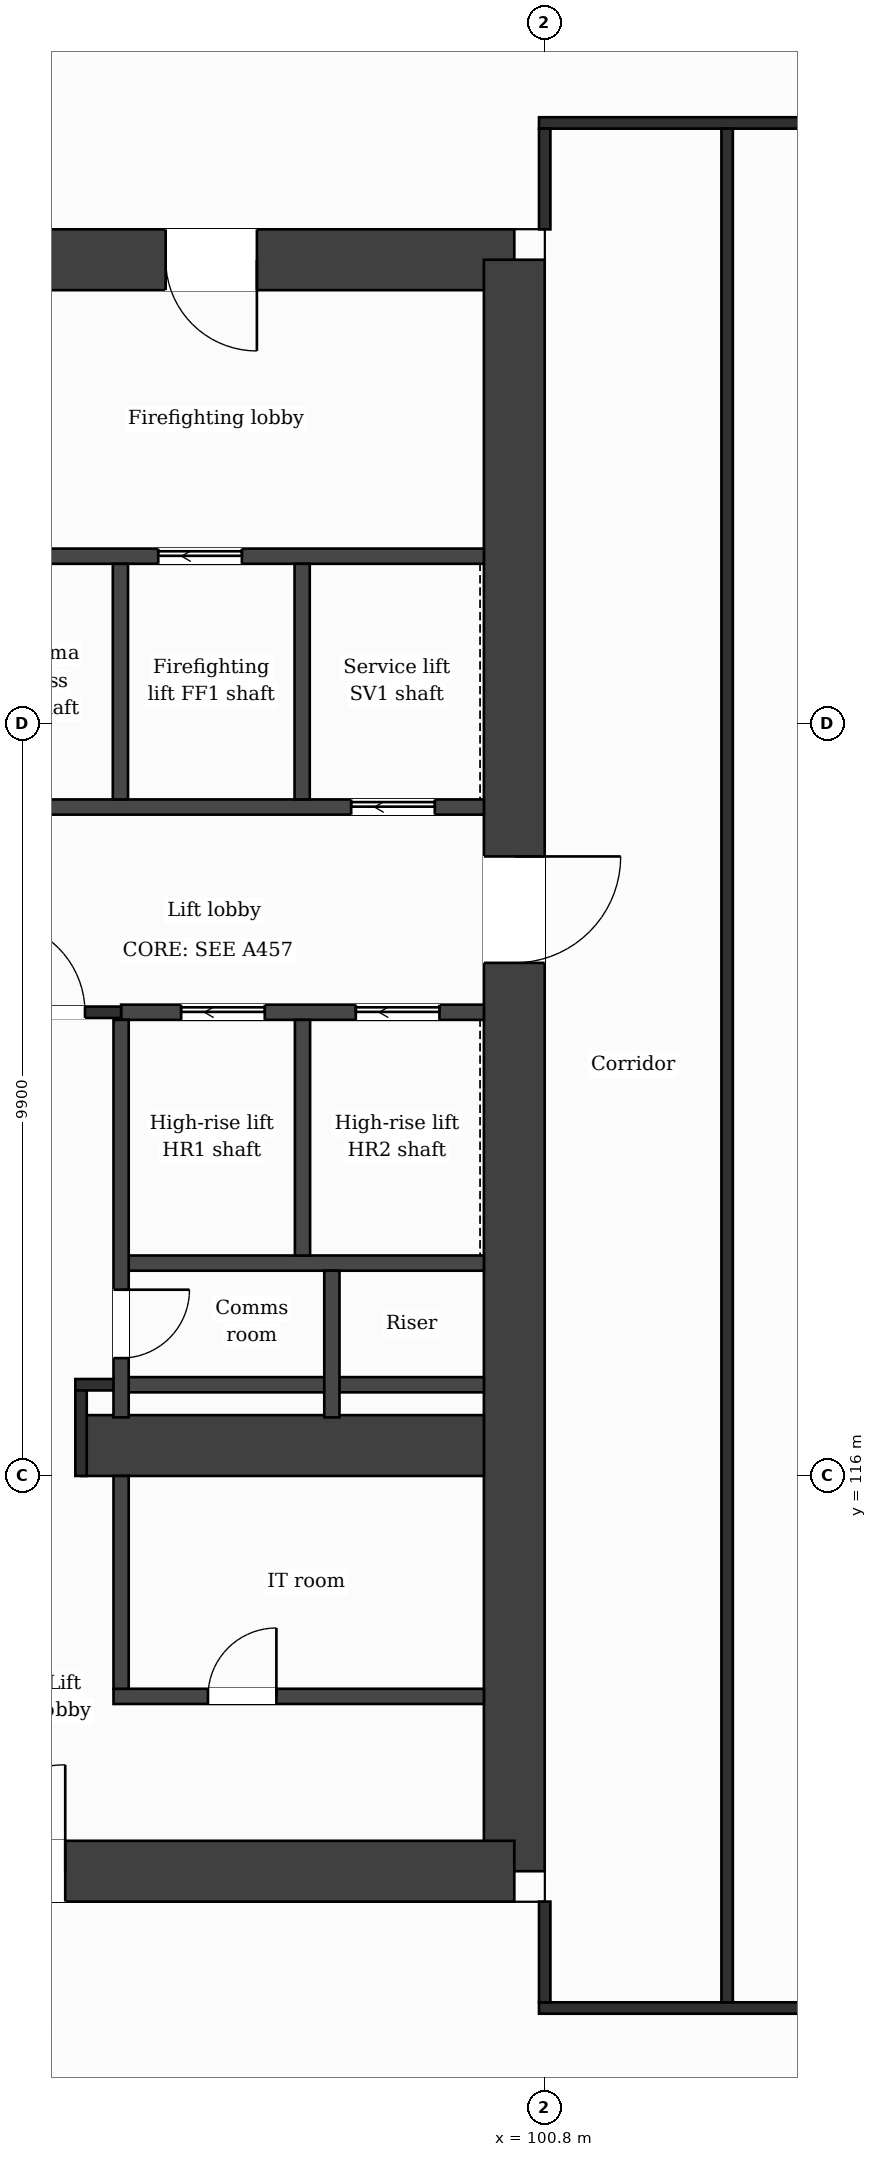
"""IFC4 building model, lengths in metres.
Left out: names, types, materials, properties, quantities, classifications, styles, units other than length and angle.
Written with IfcOpenShell. Run it as: python <this file> out.ifc"""

import sys

from ifc_helpers import new_model, si_unit, direction, frame, frame_2d, origin, place, context, subcontext, project, spatial, rectangle, extrude, element, fill, save


model = new_model("IFC4")
c1 = context("Model", 3, precision=1e-05, world=origin(), true_north=direction((0.0, 1.0)))
c2 = subcontext(c1, "Body", "Model", "MODEL_VIEW")
j1 = project(units=[si_unit("LENGTHUNIT", "METRE"), si_unit("PLANEANGLEUNIT", "RADIAN")], contexts=[c1])
p1 = place(None, origin())
s1 = spatial("IfcSite", under=j1, at=p1, CompositionType="ELEMENT")
p2 = place(p1, origin())
s2 = spatial("IfcBuilding", under=s1, at=p2, CompositionType="ELEMENT")
p3 = place(p2, frame((0.0, 0.0, 231.8)))
s3 = spatial("IfcBuildingStorey", under=s2, at=p3, CompositionType="ELEMENT", Elevation=231.8)
p4 = place(p3, frame((88.98, 132.0, 0.0), z_axis=(0.0, 0.0, 1.0), x_axis=(1.0, 0.0, 0.0)))
e1 = element("IfcWall", 1, at=p4, inside=s3, PredefinedType="SHEAR", context=c2, shape_type="SweptSolid", body=[
    extrude(rectangle(XDim=11.419, YDim=0.8, at=frame_2d((5.71, 0.0))), origin(), (0.0, 0.0, 1.0), 3.7),
])
p5 = place(p4, frame((6.833, 0.0, 0.0)))
e2 = element("IfcOpeningElement", 2, at=p5, cuts=e1, PredefinedType="OPENING", context=c2, shape_type="SweptSolid", body=[
    extrude(rectangle(XDim=1.2, YDim=2.1, at=frame_2d((0.6, 1.05))), frame((0.0, 0.41, 0.0), z_axis=(0.0, -1.0, 0.0), x_axis=(1.0, 0.0, 0.0)), (0.0, 0.0, 1.0), 0.82),
])
p6 = place(p3, frame((100.4, 132.0, 0.0), z_axis=(0.0, 0.0, 1.0), x_axis=(0.0, -1.0, 0.0)))
e3 = element("IfcWall", 3, at=p6, inside=s3, PredefinedType="SHEAR", context=c2, shape_type="SweptSolid", body=[
    extrude(rectangle(XDim=21.2, YDim=0.8, at=frame_2d((10.6, 0.0))), origin(), (0.0, 0.0, 1.0), 3.7),
])
p7 = place(p6, frame((7.85, 0.0, 0.0)))
e4 = element("IfcOpeningElement", 4, at=p7, cuts=e3, PredefinedType="OPENING", context=c2, shape_type="SweptSolid", body=[
    extrude(rectangle(XDim=1.4, YDim=2.1, at=frame_2d((0.7, 1.05))), frame((0.0, 0.41, 0.0), z_axis=(0.0, -1.0, 0.0), x_axis=(1.0, 0.0, 0.0)), (0.0, 0.0, 1.0), 0.82),
])
p8 = place(p3, frame((100.4, 110.8, 0.0), z_axis=(0.0, 0.0, 1.0), x_axis=(-1.0, 0.0, 0.0)))
e5 = element("IfcWall", 5, at=p8, inside=s3, PredefinedType="SHEAR", context=c2, shape_type="SweptSolid", body=[
    extrude(rectangle(XDim=14.273, YDim=0.8, at=frame_2d((7.137, 0.0))), origin(), (0.0, 0.0, 1.0), 3.7),
])
p9 = place(p8, frame((5.908, 0.0, 0.0)))
e6 = element("IfcOpeningElement", 6, at=p9, cuts=e5, PredefinedType="OPENING", context=c2, shape_type="SweptSolid", body=[
    extrude(rectangle(XDim=1.4, YDim=2.1, at=frame_2d((0.7, 1.05))), frame((0.0, 0.41, 0.0), z_axis=(0.0, -1.0, 0.0), x_axis=(1.0, 0.0, 0.0)), (0.0, 0.0, 1.0), 0.82),
])
p10 = place(p3, frame((94.7, 116.4, 0.0), z_axis=(0.0, 0.0, 1.0), x_axis=(1.0, 0.0, 0.0)))
e7 = element("IfcWall", 7, at=p10, inside=s3, PredefinedType="SHEAR", context=c2, shape_type="SweptSolid", body=[
    extrude(rectangle(XDim=5.3, YDim=0.8, at=frame_2d((2.65, 0.0))), origin(), (0.0, 0.0, 1.0), 3.7),
])
p11 = place(p3, frame((100.725, 109.0, 0.0), z_axis=(0.0, 0.0, 1.0), x_axis=(1.0, 0.0, 0.0)))
e8 = element("IfcWall", 8, at=p11, inside=s3, PredefinedType="PARTITIONING", context=c2, shape_type="SweptSolid", body=[
    extrude(rectangle(XDim=25.35, YDim=0.15, at=frame_2d((12.675, 0.0))), origin(), (0.0, 0.0, 1.0), 3.38),
])
p12 = place(p11, frame((5.405, 0.0, 0.0)))
e9 = element("IfcOpeningElement", 9, at=p12, cuts=e8, PredefinedType="OPENING", context=c2, shape_type="SweptSolid", body=[
    extrude(rectangle(XDim=1.0, YDim=2.1, at=frame_2d((0.5, 1.05))), frame((0.0, 0.085, 0.0), z_axis=(0.0, -1.0, 0.0), x_axis=(1.0, 0.0, 0.0)), (0.0, 0.0, 1.0), 0.17),
])
p13 = place(p11, frame((12.845, 0.0, 0.0)))
e10 = element("IfcOpeningElement", 10, at=p13, cuts=e8, PredefinedType="OPENING", context=c2, shape_type="SweptSolid", body=[
    extrude(rectangle(XDim=1.0, YDim=2.1, at=frame_2d((0.5, 1.05))), frame((0.0, 0.085, 0.0), z_axis=(0.0, -1.0, 0.0), x_axis=(1.0, 0.0, 0.0)), (0.0, 0.0, 1.0), 0.17),
])
p14 = place(p11, frame((19.805, 0.0, 0.0)))
e11 = element("IfcOpeningElement", 11, at=p14, cuts=e8, PredefinedType="OPENING", context=c2, shape_type="SweptSolid", body=[
    extrude(rectangle(XDim=1.0, YDim=2.1, at=frame_2d((0.5, 1.05))), frame((0.0, 0.085, 0.0), z_axis=(0.0, -1.0, 0.0), x_axis=(1.0, 0.0, 0.0)), (0.0, 0.0, 1.0), 0.17),
])
p15 = place(p3, frame((95.127, 113.1, 0.0), z_axis=(0.0, 0.0, 1.0), x_axis=(1.0, 0.0, 0.0)))
e12 = element("IfcWall", 12, at=p15, inside=s3, PredefinedType="PARTITIONING", context=c2, shape_type="SweptSolid", body=[
    extrude(rectangle(XDim=4.873, YDim=0.2, at=frame_2d((2.437, 0.0))), origin(), (0.0, 0.0, 1.0), 3.38),
])
p16 = place(p15, frame((1.243, 0.0, 0.0)))
e13 = element("IfcOpeningElement", 13, at=p16, cuts=e12, PredefinedType="OPENING", context=c2, shape_type="SweptSolid", body=[
    extrude(rectangle(XDim=0.9, YDim=2.1, at=frame_2d((0.45, 1.05))), frame((0.0, 0.11, 0.0), z_axis=(0.0, -1.0, 0.0), x_axis=(1.0, 0.0, 0.0)), (0.0, 0.0, 1.0), 0.22),
])
p17 = place(p3, frame((95.227, 117.2, 0.0), z_axis=(0.0, 0.0, 1.0), x_axis=(1.0, 0.0, 0.0)))
e14 = element("IfcWall", 14, at=p17, inside=s3, PredefinedType="PARTITIONING", context=c2, shape_type="SweptSolid", body=[
    extrude(rectangle(XDim=4.773, YDim=0.2, at=frame_2d((2.386, 0.0))), origin(), (0.0, 0.0, 1.0), 3.38),
])
p18 = place(p3, frame((94.625, 117.2, 0.0), z_axis=(0.0, 0.0, 1.0), x_axis=(1.0, 0.0, 0.0)))
e15 = element("IfcWall", 15, at=p18, inside=s3, PredefinedType="PARTITIONING", context=c2, shape_type="SweptSolid", body=[
    extrude(rectangle(XDim=0.602, YDim=0.15, at=frame_2d((0.301, 0.0))), origin(), (0.0, 0.0, 1.0), 3.38),
])
p19 = place(p3, frame((95.227, 118.8, 0.0), z_axis=(0.0, 0.0, 1.0), x_axis=(1.0, 0.0, 0.0)))
e16 = element("IfcWall", 16, at=p19, inside=s3, PredefinedType="PARTITIONING", context=c2, shape_type="SweptSolid", body=[
    extrude(rectangle(XDim=4.773, YDim=0.2, at=frame_2d((2.386, 0.0))), origin(), (0.0, 0.0, 1.0), 3.38),
])
p20 = place(p3, frame((95.227, 122.1, 0.0), z_axis=(0.0, 0.0, 1.0), x_axis=(1.0, 0.0, 0.0)))
e17 = element("IfcWall", 17, at=p20, inside=s3, PredefinedType="PARTITIONING", context=c2, shape_type="SweptSolid", body=[
    extrude(rectangle(XDim=4.773, YDim=0.2, at=frame_2d((2.386, 0.0))), origin(), (0.0, 0.0, 1.0), 3.38),
])
p21 = place(p20, frame((0.79, 0.0, 0.0)))
e18 = element("IfcOpeningElement", 18, at=p21, cuts=e17, PredefinedType="OPENING", context=c2, shape_type="SweptSolid", body=[
    extrude(rectangle(XDim=1.1, YDim=2.1, at=frame_2d((0.55, 1.05))), frame((0.0, 0.11, 0.0), z_axis=(0.0, -1.0, 0.0), x_axis=(1.0, 0.0, 0.0)), (0.0, 0.0, 1.0), 0.22),
])
p22 = place(p20, frame((3.088, 0.0, 0.0)))
e19 = element("IfcOpeningElement", 19, at=p22, cuts=e17, PredefinedType="OPENING", context=c2, shape_type="SweptSolid", body=[
    extrude(rectangle(XDim=1.1, YDim=2.1, at=frame_2d((0.55, 1.05))), frame((0.0, 0.11, 0.0), z_axis=(0.0, -1.0, 0.0), x_axis=(1.0, 0.0, 0.0)), (0.0, 0.0, 1.0), 0.22),
])
p23 = place(p3, frame((92.827, 122.1, 0.0), z_axis=(0.0, 0.0, 1.0), x_axis=(1.0, 0.0, 0.0)))
e20 = element("IfcWall", 20, at=p23, inside=s3, PredefinedType="PARTITIONING", context=c2, shape_type="SweptSolid", body=[
    extrude(rectangle(XDim=2.4, YDim=0.15, at=frame_2d((1.2, 0.0))), origin(), (0.0, 0.0, 1.0), 3.38),
])
p24 = place(p23, frame((0.725, 0.0, 0.0)))
e21 = element("IfcOpeningElement", 21, at=p24, cuts=e20, PredefinedType="OPENING", context=c2, shape_type="SweptSolid", body=[
    extrude(rectangle(XDim=1.2, YDim=2.1, at=frame_2d((0.6, 1.05))), frame((0.0, 0.085, 0.0), z_axis=(0.0, -1.0, 0.0), x_axis=(1.0, 0.0, 0.0)), (0.0, 0.0, 1.0), 0.17),
])
p25 = place(p3, frame((92.702, 124.8, 0.0), z_axis=(0.0, 0.0, 1.0), x_axis=(1.0, 0.0, 0.0)))
e22 = element("IfcWall", 22, at=p25, inside=s3, PredefinedType="PARTITIONING", context=c2, shape_type="SweptSolid", body=[
    extrude(rectangle(XDim=7.298, YDim=0.2, at=frame_2d((3.649, 0.0))), origin(), (0.0, 0.0, 1.0), 3.38),
])
p26 = place(p25, frame((5.552, 0.0, 0.0)))
e23 = element("IfcOpeningElement", 23, at=p26, cuts=e22, PredefinedType="OPENING", context=c2, shape_type="SweptSolid", body=[
    extrude(rectangle(XDim=1.1, YDim=2.1, at=frame_2d((0.55, 1.05))), frame((0.0, 0.11, 0.0), z_axis=(0.0, -1.0, 0.0), x_axis=(1.0, 0.0, 0.0)), (0.0, 0.0, 1.0), 0.22),
])
p27 = place(p3, frame((92.827, 128.1, 0.0), z_axis=(0.0, 0.0, 1.0), x_axis=(1.0, 0.0, 0.0)))
e24 = element("IfcWall", 24, at=p27, inside=s3, PredefinedType="PARTITIONING", context=c2, shape_type="SweptSolid", body=[
    extrude(rectangle(XDim=7.173, YDim=0.2, at=frame_2d((3.586, 0.0))), origin(), (0.0, 0.0, 1.0), 3.38),
])
p28 = place(p27, frame((2.889, 0.0, 0.0)))
e25 = element("IfcOpeningElement", 25, at=p28, cuts=e24, PredefinedType="OPENING", context=c2, shape_type="SweptSolid", body=[
    extrude(rectangle(XDim=1.1, YDim=2.1, at=frame_2d((0.55, 1.05))), frame((0.0, 0.11, 0.0), z_axis=(0.0, -1.0, 0.0), x_axis=(1.0, 0.0, 0.0)), (0.0, 0.0, 1.0), 0.22),
])
p29 = place(p3, frame((100.725, 133.8, 0.0), z_axis=(0.0, 0.0, 1.0), x_axis=(1.0, 0.0, 0.0)))
e26 = element("IfcWall", 26, at=p29, inside=s3, PredefinedType="PARTITIONING", context=c2, shape_type="SweptSolid", body=[
    extrude(rectangle(XDim=25.35, YDim=0.15, at=frame_2d((12.675, 0.0))), origin(), (0.0, 0.0, 1.0), 3.38),
])
p30 = place(p29, frame((12.845, 0.0, 0.0)))
e27 = element("IfcOpeningElement", 27, at=p30, cuts=e26, PredefinedType="OPENING", context=c2, shape_type="SweptSolid", body=[
    extrude(rectangle(XDim=1.0, YDim=2.1, at=frame_2d((0.5, 1.05))), frame((0.0, 0.085, 0.0), z_axis=(0.0, -1.0, 0.0), x_axis=(1.0, 0.0, 0.0)), (0.0, 0.0, 1.0), 0.17),
])
p31 = place(p3, frame((94.7, 116.0, 0.0), z_axis=(0.0, 0.0, 1.0), x_axis=(0.0, 1.0, 0.0)))
e28 = element("IfcWall", 28, at=p31, inside=s3, PredefinedType="PARTITIONING", context=c2, shape_type="SweptSolid", body=[
    extrude(rectangle(XDim=1.125, YDim=0.15, at=frame_2d((0.562, 0.0))), origin(), (0.0, 0.0, 1.0), 3.38),
])
p32 = place(p3, frame((95.218, 124.9, 0.0), z_axis=(0.0, 0.0, 1.0), x_axis=(0.0, 1.0, 0.0)))
e29 = element("IfcWall", 29, at=p32, inside=s3, PredefinedType="PARTITIONING", context=c2, shape_type="SweptSolid", body=[
    extrude(rectangle(XDim=3.1, YDim=0.2, at=frame_2d((1.55, 0.0))), origin(), (0.0, 0.0, 1.0), 3.38),
])
p33 = place(p3, frame((95.227, 113.2, 0.0), z_axis=(0.0, 0.0, 1.0), x_axis=(0.0, 1.0, 0.0)))
e30 = element("IfcWall", 30, at=p33, inside=s3, PredefinedType="PARTITIONING", context=c2, shape_type="SweptSolid", body=[
    extrude(rectangle(XDim=2.8, YDim=0.2, at=frame_2d((1.4, 0.0))), origin(), (0.0, 0.0, 1.0), 3.38),
])
p34 = place(p3, frame((95.227, 116.77, 0.0), z_axis=(0.0, 0.0, 1.0), x_axis=(0.0, 1.0, 0.0)))
e31 = element("IfcWall", 31, at=p34, inside=s3, PredefinedType="PARTITIONING", context=c2, shape_type="SweptSolid", body=[
    extrude(rectangle(XDim=5.23, YDim=0.2, at=frame_2d((2.615, 0.0))), origin(), (0.0, 0.0, 1.0), 3.38),
])
p35 = place(p34, frame((0.78, 0.0, 0.0)))
e32 = element("IfcOpeningElement", 32, at=p35, cuts=e31, PredefinedType="OPENING", context=c2, shape_type="SweptSolid", body=[
    extrude(rectangle(XDim=0.9, YDim=2.1, at=frame_2d((0.45, 1.05))), frame((0.0, 0.11, 0.0), z_axis=(0.0, -1.0, 0.0), x_axis=(1.0, 0.0, 0.0)), (0.0, 0.0, 1.0), 0.22),
])
for number, where, z_axis, x_axis in (
    (33, (97.609, 124.9, 0.0), (0.0, 0.0, 1.0), (0.0, 1.0, 0.0)),
    (34, (97.614, 118.9, 0.0), (0.0, 0.0, 1.0), (0.0, 1.0, 0.0)),
):
    element("IfcWall", number, at=place(p3, frame(where, z_axis=z_axis, x_axis=x_axis)), inside=s3, PredefinedType="PARTITIONING", context=c2, shape_type="SweptSolid", body=[
        extrude(rectangle(XDim=3.1, YDim=0.2, at=frame_2d((1.55, 0.0))), origin(), (0.0, 0.0, 1.0), 3.38),
    ])
p36 = place(p3, frame((98.0, 116.77, 0.0), z_axis=(0.0, 0.0, 1.0), x_axis=(0.0, 1.0, 0.0)))
e35 = element("IfcWall", 35, at=p36, inside=s3, PredefinedType="PARTITIONING", context=c2, shape_type="SweptSolid", body=[
    extrude(rectangle(XDim=1.93, YDim=0.2, at=frame_2d((0.965, 0.0))), origin(), (0.0, 0.0, 1.0), 3.38),
])
p37 = place(p3, frame((100.8, 109.075, 0.0), z_axis=(0.0, 0.0, 1.0), x_axis=(0.0, 1.0, 0.0)))
e36 = element("IfcWall", 36, at=p37, inside=s3, PredefinedType="PARTITIONING", context=c2, shape_type="SweptSolid", body=[
    extrude(rectangle(XDim=1.325, YDim=0.15, at=frame_2d((0.663, 0.0))), origin(), (0.0, 0.0, 1.0), 3.38),
])
p38 = place(p3, frame((100.8, 132.4, 0.0), z_axis=(0.0, 0.0, 1.0), x_axis=(0.0, 1.0, 0.0)))
e37 = element("IfcWall", 37, at=p38, inside=s3, PredefinedType="PARTITIONING", context=c2, shape_type="SweptSolid", body=[
    extrude(rectangle(XDim=1.325, YDim=0.15, at=frame_2d((0.663, 0.0))), origin(), (0.0, 0.0, 1.0), 3.38),
])
p39 = place(p3, frame((103.2, 109.075, 0.0), z_axis=(0.0, 0.0, 1.0), x_axis=(0.0, 1.0, 0.0)))
e38 = element("IfcWall", 38, at=p39, inside=s3, PredefinedType="PARTITIONING", context=c2, shape_type="SweptSolid", body=[
    extrude(rectangle(XDim=24.65, YDim=0.15, at=frame_2d((12.325, 0.0))), origin(), (0.0, 0.0, 1.0), 3.38),
])
p40 = place(p24, origin())
e39 = element("IfcDoor", 39, at=p40, inside=s3, OperationType="SINGLE_SWING_LEFT", PredefinedType="DOOR", context=c2, shape_type="SweptSolid", body=[
    extrude(rectangle(XDim=1.2, YDim=2.1, at=frame_2d((0.6, 1.05))), frame((0.0, 0.025, 0.0), z_axis=(0.0, -1.0, 0.0), x_axis=(1.0, 0.0, 0.0)), (0.0, 0.0, 1.0), 0.05),
])
fill(e21, e39)
p41 = place(p21, origin())
e40 = element("IfcDoor", 40, at=p41, inside=s3, OperationType="SLIDING_TO_LEFT", PredefinedType="DOOR", context=c2, shape_type="SweptSolid", body=[
    extrude(rectangle(XDim=1.1, YDim=2.1, at=frame_2d((0.55, 1.05))), frame((0.0, 0.025, 0.0), z_axis=(0.0, -1.0, 0.0), x_axis=(1.0, 0.0, 0.0)), (0.0, 0.0, 1.0), 0.05),
])
fill(e18, e40)
p42 = place(p22, origin())
e41 = element("IfcDoor", 41, at=p42, inside=s3, OperationType="SLIDING_TO_LEFT", PredefinedType="DOOR", context=c2, shape_type="SweptSolid", body=[
    extrude(rectangle(XDim=1.1, YDim=2.1, at=frame_2d((0.55, 1.05))), frame((0.0, 0.025, 0.0), z_axis=(0.0, -1.0, 0.0), x_axis=(1.0, 0.0, 0.0)), (0.0, 0.0, 1.0), 0.05),
])
fill(e19, e41)
p43 = place(p28, origin())
e42 = element("IfcDoor", 42, at=p43, inside=s3, OperationType="SLIDING_TO_LEFT", PredefinedType="DOOR", context=c2, shape_type="SweptSolid", body=[
    extrude(rectangle(XDim=1.1, YDim=2.1, at=frame_2d((0.55, 1.05))), frame((0.0, 0.025, 0.0), z_axis=(0.0, -1.0, 0.0), x_axis=(1.0, 0.0, 0.0)), (0.0, 0.0, 1.0), 0.05),
])
fill(e25, e42)
p44 = place(p26, origin())
e43 = element("IfcDoor", 43, at=p44, inside=s3, OperationType="SLIDING_TO_LEFT", PredefinedType="DOOR", context=c2, shape_type="SweptSolid", body=[
    extrude(rectangle(XDim=1.1, YDim=2.1, at=frame_2d((0.55, 1.05))), frame((0.0, 0.025, 0.0), z_axis=(0.0, -1.0, 0.0), x_axis=(1.0, 0.0, 0.0)), (0.0, 0.0, 1.0), 0.05),
])
fill(e23, e43)
p45 = place(p35, origin())
e44 = element("IfcDoor", 44, at=p45, inside=s3, OperationType="SINGLE_SWING_RIGHT", PredefinedType="DOOR", context=c2, shape_type="SweptSolid", body=[
    extrude(rectangle(XDim=0.9, YDim=2.1, at=frame_2d((0.45, 1.05))), frame((0.0, 0.025, 0.0), z_axis=(0.0, -1.0, 0.0), x_axis=(1.0, 0.0, 0.0)), (0.0, 0.0, 1.0), 0.05),
])
fill(e32, e44)
p46 = place(p16, origin())
e45 = element("IfcDoor", 45, at=p46, inside=s3, OperationType="SINGLE_SWING_RIGHT", PredefinedType="DOOR", context=c2, shape_type="SweptSolid", body=[
    extrude(rectangle(XDim=0.9, YDim=2.1, at=frame_2d((0.45, 1.05))), frame((0.0, 0.025, 0.0), z_axis=(0.0, -1.0, 0.0), x_axis=(1.0, 0.0, 0.0)), (0.0, 0.0, 1.0), 0.05),
])
fill(e13, e45)
p47 = place(p9, origin())
e46 = element("IfcDoor", 46, at=p47, inside=s3, OperationType="SINGLE_SWING_LEFT", PredefinedType="DOOR", context=c2, shape_type="SweptSolid", body=[
    extrude(rectangle(XDim=1.4, YDim=2.1, at=frame_2d((0.7, 1.05))), frame((0.0, 0.025, 0.0), z_axis=(0.0, -1.0, 0.0), x_axis=(1.0, 0.0, 0.0)), (0.0, 0.0, 1.0), 0.05),
])
fill(e6, e46)
p48 = place(p5, origin())
e47 = element("IfcDoor", 47, at=p48, inside=s3, OperationType="SINGLE_SWING_RIGHT", PredefinedType="DOOR", context=c2, shape_type="SweptSolid", body=[
    extrude(rectangle(XDim=1.2, YDim=2.1, at=frame_2d((0.6, 1.05))), frame((0.0, 0.025, 0.0), z_axis=(0.0, -1.0, 0.0), x_axis=(1.0, 0.0, 0.0)), (0.0, 0.0, 1.0), 0.05),
])
fill(e2, e47)
p49 = place(p7, origin())
e48 = element("IfcDoor", 48, at=p49, inside=s3, OperationType="SINGLE_SWING_LEFT", PredefinedType="DOOR", context=c2, shape_type="SweptSolid", body=[
    extrude(rectangle(XDim=1.4, YDim=2.1, at=frame_2d((0.7, 1.05))), frame((0.0, 0.025, 0.0), z_axis=(0.0, -1.0, 0.0), x_axis=(1.0, 0.0, 0.0)), (0.0, 0.0, 1.0), 0.05),
])
fill(e4, e48)
save(model, sys.argv[1])
